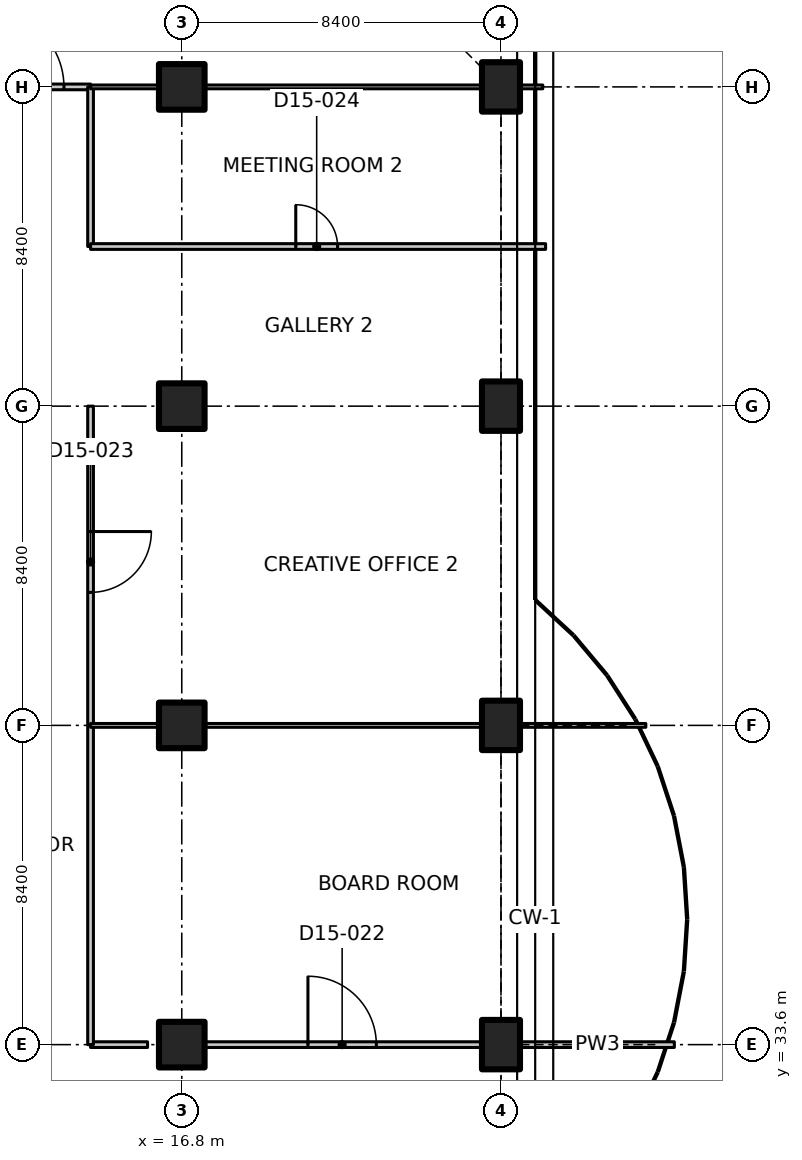
"""IFC4 building model, lengths in metres.
Left out: names, types, materials, properties, quantities, classifications, styles, units other than length and angle.
Written with IfcOpenShell. Run it as: python <this file> out.ifc"""

import sys

from ifc_helpers import new_model, si_unit, direction, frame, frame_2d, origin, origin_2d, place, context, subcontext, project, spatial, polyline, rectangle, outline, extrude, element, fill, save


model = new_model("IFC4")
c1 = context("Model", 3, precision=1e-05, world=origin(), true_north=direction((0.0, 1.0)))
c2 = subcontext(c1, "Body", "Model", "MODEL_VIEW")
j1 = project(units=[si_unit("LENGTHUNIT", "METRE"), si_unit("PLANEANGLEUNIT", "RADIAN")], contexts=[c1])
p1 = place(None, origin())
s1 = spatial("IfcSite", under=j1, at=p1, CompositionType="ELEMENT")
p2 = place(p1, origin())
s2 = spatial("IfcBuilding", under=s1, at=p2, CompositionType="ELEMENT")
p3 = place(p2, frame((0.0, 0.0, 116.9)))
s3 = spatial("IfcBuildingStorey", under=s2, at=p3, CompositionType="ELEMENT", Elevation=116.9)
for number, where, z_axis, x_axis in (
    (1, (16.8, 33.6, 0.0), (0.0, 0.0, 1.0), (1.0, 0.0, 0.0)),
    (2, (16.8, 42.0, 0.0), (0.0, 0.0, 1.0), (1.0, 0.0, 0.0)),
    (3, (16.8, 50.4, 0.0), (0.0, 0.0, 1.0), (1.0, 0.0, 0.0)),
    (4, (16.8, 58.8, 0.0), (0.0, 0.0, 1.0), (1.0, 0.0, 0.0)),
):
    element("IfcColumn", number, at=place(p3, frame(where, z_axis=z_axis, x_axis=x_axis)), inside=s3, PredefinedType="COLUMN", context=c2, shape_type="SweptSolid", body=[
        extrude(rectangle(XDim=1.2, YDim=1.2, at=origin_2d()), origin(), (0.0, 0.0, 1.0), 3.35),
    ])
for number, where, z_axis, x_axis in (
    (5, (25.2, 33.6, 0.0), (0.0, 0.0, 1.0), (1.0, 0.0, 0.0)),
    (6, (25.2, 42.0, 0.0), (0.0, 0.0, 1.0), (1.0, 0.0, 0.0)),
    (7, (25.2, 50.4, 0.0), (0.0, 0.0, 1.0), (1.0, 0.0, 0.0)),
    (8, (25.2, 58.8, 0.0), (0.0, 0.0, 1.0), (1.0, 0.0, 0.0)),
):
    element("IfcColumn", number, at=place(p3, frame(where, z_axis=z_axis, x_axis=x_axis)), inside=s3, PredefinedType="COLUMN", context=c2, shape_type="SweptSolid", body=[
        extrude(rectangle(XDim=1.0, YDim=1.3, at=origin_2d()), origin(), (0.0, 0.0, 1.0), 3.35),
    ])
p4 = place(p3, frame((14.4, 33.6, 0.0), z_axis=(0.0, 0.0, 1.0), x_axis=(1.0, 0.0, 0.0)))
e9 = element("IfcWall", 9, at=p4, inside=s3, PredefinedType="PARTITIONING", context=c2, shape_type="SweptSolid", body=[
    extrude(rectangle(XDim=1.5, YDim=0.15, at=frame_2d((0.75, 0.0))), origin(), (0.0, 0.0, 1.0), 3.33),
])
p5 = place(p3, frame((17.42, 33.6, 0.0), z_axis=(0.0, 0.0, 1.0), x_axis=(1.0, 0.0, 0.0)))
e10 = element("IfcWall", 10, at=p5, inside=s3, PredefinedType="PARTITIONING", context=c2, shape_type="SweptSolid", body=[
    extrude(rectangle(XDim=7.26, YDim=0.15, at=frame_2d((3.63, 0.0))), origin(), (0.0, 0.0, 1.0), 3.33),
])
p6 = place(p5, frame((2.7, 0.0, 0.0)))
e11 = element("IfcOpeningElement", 11, at=p6, cuts=e10, PredefinedType="OPENING", context=c2, shape_type="SweptSolid", body=[
    extrude(rectangle(XDim=1.8, YDim=2.1, at=frame_2d((0.9, 1.05))), frame((0.0, 0.085, 0.0), z_axis=(0.0, -1.0, 0.0), x_axis=(1.0, 0.0, 0.0)), (0.0, 0.0, 1.0), 0.17),
])
p7 = place(p3, frame((25.72, 33.6, 0.0), z_axis=(0.0, 0.0, 1.0), x_axis=(1.0, 0.0, 0.0)))
e12 = element("IfcWall", 12, at=p7, inside=s3, PredefinedType="PARTITIONING", context=c2, shape_type="SweptSolid", body=[
    extrude(rectangle(XDim=4.042, YDim=0.15, at=frame_2d((2.021, 0.0))), origin(), (0.0, 0.0, 1.0), 2.98),
])
p8 = place(p3, frame((10.8, 58.8, 0.0), z_axis=(0.0, 0.0, 1.0), x_axis=(1.0, 0.0, 0.0)))
e13 = element("IfcWall", 13, at=p8, inside=s3, PredefinedType="PARTITIONING", context=c2, shape_type="SweptSolid", body=[
    extrude(rectangle(XDim=3.6, YDim=0.15, at=frame_2d((1.8, 0.0))), origin(), (0.0, 0.0, 1.0), 3.33),
])
p9 = place(p8, frame((0.9, 0.0, 0.0)))
e14 = element("IfcOpeningElement", 14, at=p9, cuts=e13, PredefinedType="OPENING", context=c2, shape_type="SweptSolid", body=[
    extrude(rectangle(XDim=2.0, YDim=2.4, at=frame_2d((1.0, 1.2))), frame((0.0, 0.085, 0.0), z_axis=(0.0, -1.0, 0.0), x_axis=(1.0, 0.0, 0.0)), (0.0, 0.0, 1.0), 0.17),
])
p10 = place(p3, frame((14.4, 42.0, 0.0), z_axis=(0.0, 0.0, 1.0), x_axis=(0.0, -1.0, 0.0)))
e15 = element("IfcWall", 15, at=p10, inside=s3, PredefinedType="PARTITIONING", context=c2, shape_type="SweptSolid", body=[
    extrude(rectangle(XDim=8.4, YDim=0.15, at=frame_2d((4.2, 0.0))), origin(), (0.0, 0.0, 1.0), 3.33),
])
p11 = place(p3, frame((14.4, 50.4, 0.0), z_axis=(0.0, 0.0, 1.0), x_axis=(0.0, -1.0, 0.0)))
e16 = element("IfcWall", 16, at=p11, inside=s3, PredefinedType="PARTITIONING", context=c2, shape_type="SweptSolid", body=[
    extrude(rectangle(XDim=8.4, YDim=0.15, at=frame_2d((4.2, 0.0))), origin(), (0.0, 0.0, 1.0), 3.33),
])
p12 = place(p11, frame((3.3, 0.0, 0.0)))
e17 = element("IfcOpeningElement", 17, at=p12, cuts=e16, PredefinedType="OPENING", context=c2, shape_type="SweptSolid", body=[
    extrude(rectangle(XDim=1.6, YDim=2.1, at=frame_2d((0.8, 1.05))), frame((0.0, 0.085, 0.0), z_axis=(0.0, -1.0, 0.0), x_axis=(1.0, 0.0, 0.0)), (0.0, 0.0, 1.0), 0.17),
])
p13 = place(p3, frame((14.4, 58.8, 0.0), z_axis=(0.0, 0.0, 1.0), x_axis=(0.0, -1.0, 0.0)))
e18 = element("IfcWall", 18, at=p13, inside=s3, PredefinedType="PARTITIONING", context=c2, shape_type="SweptSolid", body=[
    extrude(rectangle(XDim=4.2, YDim=0.15, at=frame_2d((2.1, 0.0))), origin(), (0.0, 0.0, 1.0), 3.33),
])
p14 = place(p3, frame((26.3, 58.8, 0.0), z_axis=(0.0, 0.0, 1.0), x_axis=(-1.0, 0.0, 0.0)))
e19 = element("IfcWall", 19, at=p14, inside=s3, PredefinedType="PARTITIONING", context=c2, shape_type="SweptSolid", body=[
    extrude(rectangle(XDim=0.58, YDim=0.1, at=frame_2d((0.29, 0.0))), origin(), (0.0, 0.0, 1.0), 3.33),
])
p15 = place(p3, frame((24.68, 58.8, 0.0), z_axis=(0.0, 0.0, 1.0), x_axis=(-1.0, 0.0, 0.0)))
e20 = element("IfcWall", 20, at=p15, inside=s3, PredefinedType="PARTITIONING", context=c2, shape_type="SweptSolid", body=[
    extrude(outline(polyline([(0.0, 0.0), (7.26, 0.0), (7.26, 3.33), (0.146, 3.33), (0.144, 2.98), (0.0, 2.98), (0.0, 0.0)])), frame((0.0, 0.05, 0.0), z_axis=(0.0, -1.0, 0.0), x_axis=(1.0, 0.0, 0.0)), (0.0, 0.0, 1.0), 0.1),
])
p16 = place(p3, frame((16.18, 58.8, 0.0), z_axis=(0.0, 0.0, 1.0), x_axis=(-1.0, 0.0, 0.0)))
e21 = element("IfcWall", 21, at=p16, inside=s3, PredefinedType="PARTITIONING", context=c2, shape_type="SweptSolid", body=[
    extrude(rectangle(XDim=1.78, YDim=0.1, at=frame_2d((0.89, 0.0))), origin(), (0.0, 0.0, 1.0), 3.33),
])
p17 = place(p3, frame((14.4, 54.6, 0.0), z_axis=(0.0, 0.0, 1.0), x_axis=(1.0, 0.0, 0.0)))
e22 = element("IfcWall", 22, at=p17, inside=s3, PredefinedType="PARTITIONING", context=c2, shape_type="SweptSolid", body=[
    extrude(outline(polyline([(0.0, 0.0), (11.974, 0.0), (11.974, 3.33), (11.9, 3.33), (11.25, 3.33), (11.248, 2.98), (10.352, 2.98), (10.35, 3.33), (0.0, 3.33), (0.0, 0.0)])), frame((0.0, 0.075, 0.0), z_axis=(0.0, -1.0, 0.0), x_axis=(1.0, 0.0, 0.0)), (0.0, 0.0, 1.0), 0.15),
])
p18 = place(p17, frame((5.4, 0.0, 0.0)))
e23 = element("IfcOpeningElement", 23, at=p18, cuts=e22, PredefinedType="OPENING", context=c2, shape_type="SweptSolid", body=[
    extrude(rectangle(XDim=1.1, YDim=2.1, at=frame_2d((0.55, 1.05))), frame((0.0, 0.085, 0.0), z_axis=(0.0, -1.0, 0.0), x_axis=(1.0, 0.0, 0.0)), (0.0, 0.0, 1.0), 0.17),
])
p19 = place(p3, frame((14.4, 42.0, 0.0), z_axis=(0.0, 0.0, 1.0), x_axis=(1.0, 0.0, 0.0)))
e24 = element("IfcWall", 24, at=p19, inside=s3, PredefinedType="PARTITIONING", context=c2, shape_type="SweptSolid", body=[
    extrude(rectangle(XDim=1.78, YDim=0.1, at=frame_2d((0.89, 0.0))), origin(), (0.0, 0.0, 1.0), 3.33),
])
p20 = place(p3, frame((17.42, 42.0, 0.0), z_axis=(0.0, 0.0, 1.0), x_axis=(1.0, 0.0, 0.0)))
e25 = element("IfcWall", 25, at=p20, inside=s3, PredefinedType="PARTITIONING", context=c2, shape_type="SweptSolid", body=[
    extrude(rectangle(XDim=7.26, YDim=0.1, at=frame_2d((3.63, 0.0))), origin(), (0.0, 0.0, 1.0), 3.33),
])
p21 = place(p3, frame((25.72, 42.0, 0.0), z_axis=(0.0, 0.0, 1.0), x_axis=(1.0, 0.0, 0.0)))
e26 = element("IfcWall", 26, at=p21, inside=s3, PredefinedType="PARTITIONING", context=c2, shape_type="SweptSolid", body=[
    extrude(rectangle(XDim=3.292, YDim=0.1, at=frame_2d((1.646, 0.0))), origin(), (0.0, 0.0, 1.0), 2.98),
])
p22 = place(p9, origin())
e27 = element("IfcDoor", 27, at=p22, inside=s3, OperationType="DOUBLE_DOOR_SINGLE_SWING", PredefinedType="DOOR", context=c2, shape_type="SweptSolid", body=[
    extrude(rectangle(XDim=2.0, YDim=2.4, at=frame_2d((1.0, 1.2))), frame((0.0, 0.025, 0.0), z_axis=(0.0, -1.0, 0.0), x_axis=(1.0, 0.0, 0.0)), (0.0, 0.0, 1.0), 0.05),
])
fill(e14, e27)
p23 = place(p6, origin())
e28 = element("IfcDoor", 28, at=p23, inside=s3, OperationType="DOUBLE_DOOR_SINGLE_SWING", PredefinedType="DOOR", context=c2, shape_type="SweptSolid", body=[
    extrude(rectangle(XDim=1.8, YDim=2.1, at=frame_2d((0.9, 1.05))), frame((0.0, 0.025, 0.0), z_axis=(0.0, -1.0, 0.0), x_axis=(1.0, 0.0, 0.0)), (0.0, 0.0, 1.0), 0.05),
])
fill(e11, e28)
p24 = place(p12, origin())
e29 = element("IfcDoor", 29, at=p24, inside=s3, OperationType="DOUBLE_DOOR_SINGLE_SWING", PredefinedType="DOOR", context=c2, shape_type="SweptSolid", body=[
    extrude(rectangle(XDim=1.6, YDim=2.1, at=frame_2d((0.8, 1.05))), frame((0.0, 0.025, 0.0), z_axis=(0.0, -1.0, 0.0), x_axis=(1.0, 0.0, 0.0)), (0.0, 0.0, 1.0), 0.05),
])
fill(e17, e29)
p25 = place(p18, origin())
e30 = element("IfcDoor", 30, at=p25, inside=s3, OperationType="SINGLE_SWING_LEFT", PredefinedType="DOOR", context=c2, shape_type="SweptSolid", body=[
    extrude(rectangle(XDim=1.1, YDim=2.1, at=frame_2d((0.55, 1.05))), frame((0.0, 0.025, 0.0), z_axis=(0.0, -1.0, 0.0), x_axis=(1.0, 0.0, 0.0)), (0.0, 0.0, 1.0), 0.05),
])
fill(e23, e30)
save(model, sys.argv[1])
